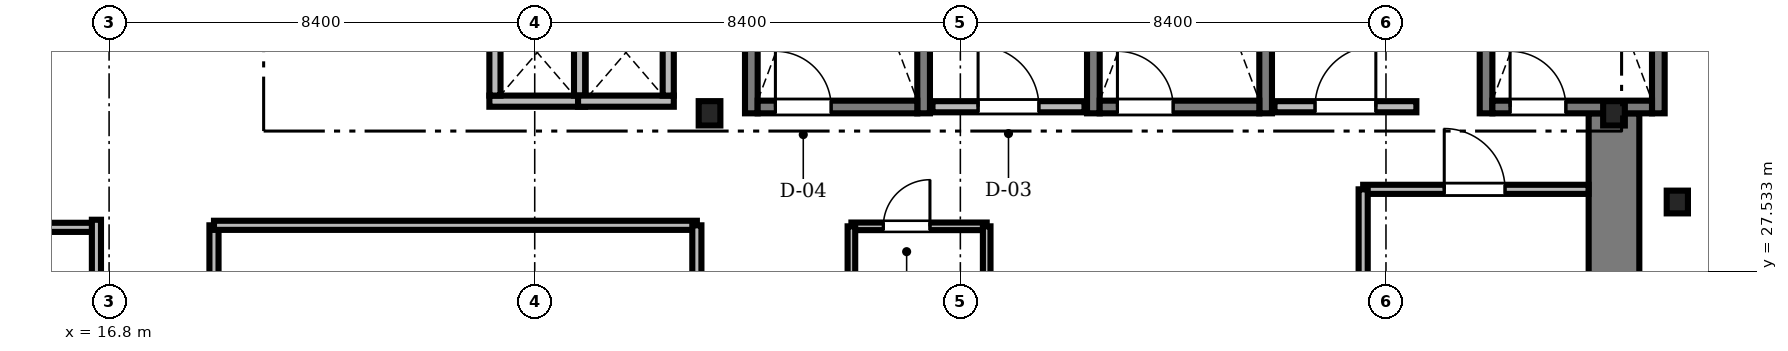
"""IFC4 building model, lengths in metres.
Left out: names, types, materials, properties, quantities, classifications, styles, units other than length and angle.
Written with IfcOpenShell. Run it as: python <this file> out.ifc"""

import sys

from ifc_helpers import new_model, si_unit, direction, frame, frame_2d, origin, origin_2d, place, context, subcontext, project, spatial, rectangle, i_section, extrude, source, transform, mapped, element, fill, save


model = new_model("IFC4")
c1 = context("Model", 3, precision=1e-05, world=origin(), true_north=direction((0.0, 1.0)))
c2 = subcontext(c1, "Body", "Model", "MODEL_VIEW")
j1 = project(units=[si_unit("LENGTHUNIT", "METRE"), si_unit("PLANEANGLEUNIT", "RADIAN")], contexts=[c1])
p1 = place(None, origin())
s1 = spatial("IfcSite", under=j1, at=p1, CompositionType="ELEMENT")
p2 = place(p1, origin())
s2 = spatial("IfcBuilding", under=s1, at=p2, CompositionType="ELEMENT")
p3 = place(p2, frame((0.0, 0.0, 75.05)))
s3 = spatial("IfcBuildingStorey", under=s2, at=p3, CompositionType="ELEMENT", Elevation=75.05)
m1 = source(origin(), c2, "Body", "SweptSolid", [
    extrude(rectangle(XDim=13.15, YDim=1.0, at=frame_2d((6.575, 0.0))), origin(), (0.0, 0.0, 1.0), 3.41),
])
p4 = place(p3, frame((46.5, 17.5, 0.0), z_axis=(0.0, 0.0, 1.0), x_axis=(0.0, 1.0, 0.0)))
e1 = element("IfcWall", 1, at=p4, inside=s3, PredefinedType="SHEAR", context=c2, shape_type="MappedRepresentation", body=[
    mapped(m1, transform((0.0, 0.0, 0.0), scale=1.0)),
])
m2 = source(origin(), c2, "Body", "SweptSolid", [
    extrude(i_section(OverallWidth=0.428, OverallDepth=0.481, WebThickness=0.04, FlangeThickness=0.063, FilletRadius=0.015, at=origin_2d()), origin(), (0.0, 0.0, 1.0), 3.41),
])
for number, where, z_axis, x_axis in (
    (2, (28.65, 30.65, 0.0), (0.0, 0.0, 1.0), (1.0, 0.0, 0.0)),
    (3, (46.5, 30.65, 0.0), (0.0, 0.0, 1.0), (1.0, 0.0, 0.0)),
):
    element("IfcColumn", number, at=place(p3, frame(where, z_axis=z_axis, x_axis=x_axis)), inside=s3, PredefinedType="COLUMN", context=c2, shape_type="MappedRepresentation", body=[
        mapped(m2, transform((0.0, 0.0, 0.0), scale=1.0)),
    ])
m3 = source(origin(), c2, "Body", "SweptSolid", [
    extrude(i_section(OverallWidth=0.419, OverallDepth=0.449, WebThickness=0.031, FlangeThickness=0.048, FilletRadius=0.015, at=origin_2d()), origin(), (0.0, 0.0, 1.0), 3.41),
])
p5 = place(p3, frame((47.75, 28.9, 0.0), z_axis=(0.0, 0.0, 1.0), x_axis=(1.0, 0.0, 0.0)))
e4 = element("IfcColumn", 4, at=p5, inside=s3, PredefinedType="COLUMN", context=c2, shape_type="MappedRepresentation", body=[
    mapped(m3, transform((0.0, 0.0, 0.0), scale=1.0)),
])
m4 = source(origin(), c2, "Body", "SweptSolid", [
    extrude(rectangle(XDim=9.15, YDim=0.25, at=frame_2d((4.575, 0.0))), origin(), (0.0, 0.0, 1.0), 3.45),
])
for number, where, z_axis, x_axis in (
    (5, (29.475, 30.65, 0.0), (0.0, 0.0, 1.0), (0.0, 1.0, 0.0)),
    (6, (32.875, 30.65, 0.0), (0.0, 0.0, 1.0), (0.0, 1.0, 0.0)),
):
    element("IfcWall", number, at=place(p3, frame(where, z_axis=z_axis, x_axis=x_axis)), inside=s3, PredefinedType="SOLIDWALL", context=c2, shape_type="MappedRepresentation", body=[
        mapped(m4, transform((0.0, 0.0, 0.0), scale=1.0)),
    ])
m5 = source(origin(), c2, "Body", "SweptSolid", [
    extrude(rectangle(XDim=3.15, YDim=0.25, at=frame_2d((1.575, 0.0))), origin(), (0.0, 0.0, 1.0), 3.45),
])
p6 = place(p3, frame((29.6, 30.775, 0.0), z_axis=(0.0, 0.0, 1.0), x_axis=(1.0, 0.0, 0.0)))
e7 = element("IfcWall", 7, at=p6, inside=s3, PredefinedType="SOLIDWALL", context=c2, shape_type="MappedRepresentation", body=[
    mapped(m5, transform((0.0, 0.0, 0.0), scale=1.0)),
])
m6 = source(origin(), c2, "Body", "SweptSolid", [
    extrude(rectangle(XDim=1.1, YDim=2.2, at=frame_2d((0.55, 1.1))), frame((0.0, 0.135, 0.0), z_axis=(0.0, -1.0, 0.0), x_axis=(1.0, 0.0, 0.0)), (0.0, 0.0, 1.0), 0.27),
])
p7 = place(p6, frame((0.35, 0.0, 0.0)))
e8 = element("IfcOpeningElement", 8, at=p7, cuts=e7, PredefinedType="OPENING", context=c2, shape_type="MappedRepresentation", body=[
    mapped(m6, transform((0.0, 0.0, 0.0), scale=1.0)),
])
for number, where, z_axis, x_axis in (
    (9, (36.225, 30.65, 0.0), (0.0, 0.0, 1.0), (0.0, 1.0, 0.0)),
    (10, (39.625, 30.65, 0.0), (0.0, 0.0, 1.0), (0.0, 1.0, 0.0)),
):
    element("IfcWall", number, at=place(p3, frame(where, z_axis=z_axis, x_axis=x_axis)), inside=s3, PredefinedType="SOLIDWALL", context=c2, shape_type="MappedRepresentation", body=[
        mapped(m4, transform((0.0, 0.0, 0.0), scale=1.0)),
    ])
p8 = place(p3, frame((36.35, 30.775, 0.0), z_axis=(0.0, 0.0, 1.0), x_axis=(1.0, 0.0, 0.0)))
e11 = element("IfcWall", 11, at=p8, inside=s3, PredefinedType="SOLIDWALL", context=c2, shape_type="MappedRepresentation", body=[
    mapped(m5, transform((0.0, 0.0, 0.0), scale=1.0)),
])
p9 = place(p8, frame((0.35, 0.0, 0.0)))
e12 = element("IfcOpeningElement", 12, at=p9, cuts=e11, PredefinedType="OPENING", context=c2, shape_type="MappedRepresentation", body=[
    mapped(m6, transform((0.0, 0.0, 0.0), scale=1.0)),
])
for number, where, z_axis, x_axis in (
    (13, (43.975, 30.65, 0.0), (0.0, 0.0, 1.0), (0.0, 1.0, 0.0)),
    (14, (47.375, 30.65, 0.0), (0.0, 0.0, 1.0), (0.0, 1.0, 0.0)),
):
    element("IfcWall", number, at=place(p3, frame(where, z_axis=z_axis, x_axis=x_axis)), inside=s3, PredefinedType="SOLIDWALL", context=c2, shape_type="MappedRepresentation", body=[
        mapped(m4, transform((0.0, 0.0, 0.0), scale=1.0)),
    ])
p10 = place(p3, frame((44.1, 30.775, 0.0), z_axis=(0.0, 0.0, 1.0), x_axis=(1.0, 0.0, 0.0)))
e15 = element("IfcWall", 15, at=p10, inside=s3, PredefinedType="SOLIDWALL", context=c2, shape_type="MappedRepresentation", body=[
    mapped(m5, transform((0.0, 0.0, 0.0), scale=1.0)),
])
p11 = place(p10, frame((0.35, 0.0, 0.0)))
e16 = element("IfcOpeningElement", 16, at=p11, cuts=e15, PredefinedType="OPENING", context=c2, shape_type="MappedRepresentation", body=[
    mapped(m6, transform((0.0, 0.0, 0.0), scale=1.0)),
])
m7 = source(origin(), c2, "Body", "SweptSolid", [
    extrude(rectangle(XDim=3.0, YDim=0.22, at=frame_2d((1.5, 0.0))), origin(), (0.0, 0.0, 1.0), 3.41),
])
p12 = place(p3, frame((33.05, 30.78, 0.0), z_axis=(0.0, 0.0, 1.0), x_axis=(1.0, 0.0, 0.0)))
e17 = element("IfcWall", 17, at=p12, inside=s3, PredefinedType="SOLIDWALL", context=c2, shape_type="MappedRepresentation", body=[
    mapped(m7, transform((0.0, 0.0, 0.0), scale=1.0)),
])
m8 = source(origin(), c2, "Body", "SweptSolid", [
    extrude(rectangle(XDim=1.2, YDim=2.2, at=frame_2d((0.6, 1.1))), frame((0.0, 0.12, 0.0), z_axis=(0.0, -1.0, 0.0), x_axis=(1.0, 0.0, 0.0)), (0.0, 0.0, 1.0), 0.24),
])
p13 = place(p12, frame((0.9, 0.0, 0.0)))
e18 = element("IfcOpeningElement", 18, at=p13, cuts=e17, PredefinedType="OPENING", context=c2, shape_type="MappedRepresentation", body=[
    mapped(m8, transform((0.0, 0.0, 0.0), scale=1.0)),
])
m9 = source(origin(), c2, "Body", "SweptSolid", [
    extrude(rectangle(XDim=2.8, YDim=0.22, at=frame_2d((1.4, 0.0))), origin(), (0.0, 0.0, 1.0), 3.41),
])
p14 = place(p3, frame((39.8, 30.78, 0.0), z_axis=(0.0, 0.0, 1.0), x_axis=(1.0, 0.0, 0.0)))
e19 = element("IfcWall", 19, at=p14, inside=s3, PredefinedType="SOLIDWALL", context=c2, shape_type="MappedRepresentation", body=[
    mapped(m9, transform((0.0, 0.0, 0.0), scale=1.0)),
])
p15 = place(p14, frame((0.8, 0.0, 0.0)))
e20 = element("IfcOpeningElement", 20, at=p15, cuts=e19, PredefinedType="OPENING", context=c2, shape_type="MappedRepresentation", body=[
    mapped(m8, transform((0.0, 0.0, 0.0), scale=1.0)),
])
m10 = source(origin(), c2, "Body", "SweptSolid", [
    extrude(rectangle(XDim=1.89, YDim=0.22, at=frame_2d((0.945, 0.0))), origin(), (0.0, 0.0, 1.0), 3.41),
])
p16 = place(p3, frame((24.305, 30.89, 0.0), z_axis=(0.0, 0.0, 1.0), x_axis=(1.0, 0.0, 0.0)))
e21 = element("IfcWall", 21, at=p16, inside=s3, PredefinedType="SOLIDWALL", context=c2, shape_type="MappedRepresentation", body=[
    mapped(m10, transform((0.0, 0.0, 0.0), scale=1.0)),
])
m11 = source(origin(), c2, "Body", "SweptSolid", [
    extrude(rectangle(XDim=1.7, YDim=0.22, at=frame_2d((0.85, 0.0))), origin(), (0.0, 0.0, 1.0), 3.41),
])
for number, where, z_axis, x_axis in (
    (22, (24.415, 31.0, 0.0), (0.0, 0.0, 1.0), (0.0, 1.0, 0.0)),
    (23, (26.085, 31.0, 0.0), (0.0, 0.0, 1.0), (0.0, 1.0, 0.0)),
):
    element("IfcWall", number, at=place(p3, frame(where, z_axis=z_axis, x_axis=x_axis)), inside=s3, PredefinedType="SOLIDWALL", context=c2, shape_type="MappedRepresentation", body=[
        mapped(m11, transform((0.0, 0.0, 0.0), scale=1.0)),
    ])
p17 = place(p3, frame((26.055, 30.89, 0.0), z_axis=(0.0, 0.0, 1.0), x_axis=(1.0, 0.0, 0.0)))
e24 = element("IfcWall", 24, at=p17, inside=s3, PredefinedType="SOLIDWALL", context=c2, shape_type="MappedRepresentation", body=[
    mapped(m10, transform((0.0, 0.0, 0.0), scale=1.0)),
])
p18 = place(p3, frame((27.835, 31.0, 0.0), z_axis=(0.0, 0.0, 1.0), x_axis=(0.0, 1.0, 0.0)))
e25 = element("IfcWall", 25, at=p18, inside=s3, PredefinedType="SOLIDWALL", context=c2, shape_type="MappedRepresentation", body=[
    mapped(m11, transform((0.0, 0.0, 0.0), scale=1.0)),
])
m12 = source(origin(), c2, "Body", "SweptSolid", [
    extrude(rectangle(XDim=6.54, YDim=0.18, at=frame_2d((3.27, 0.0))), origin(), (0.0, 0.0, 1.0), 2.802),
])
p19 = place(p3, frame((18.87, 21.9, 0.0), z_axis=(0.0, 0.0, 1.0), x_axis=(0.0, 1.0, 0.0)))
e26 = element("IfcWall", 26, at=p19, inside=s3, PredefinedType="PARTITIONING", context=c2, shape_type="MappedRepresentation", body=[
    mapped(m12, transform((0.0, 0.0, 0.0), scale=1.0)),
])
m13 = source(origin(), c2, "Body", "SweptSolid", [
    extrude(rectangle(XDim=1.05, YDim=2.2, at=frame_2d((0.525, 1.1))), frame((0.0, 0.1, 0.0), z_axis=(0.0, -1.0, 0.0), x_axis=(1.0, 0.0, 0.0)), (0.0, 0.0, 1.0), 0.2),
])
p20 = place(p19, frame((2.2, 0.0, 0.0)))
e27 = element("IfcOpeningElement", 27, at=p20, cuts=e26, PredefinedType="OPENING", context=c2, shape_type="MappedRepresentation", body=[
    mapped(m13, transform((0.0, 0.0, 0.0), scale=1.0)),
])
m14 = source(origin(), c2, "Body", "SweptSolid", [
    extrude(rectangle(XDim=4.448, YDim=0.18, at=frame_2d((2.224, 0.0))), origin(), (0.0, 0.0, 1.0), 3.042),
])
p21 = place(p3, frame((41.55, 29.15, 0.0), z_axis=(0.0, 0.0, 1.0), x_axis=(1.0, 0.0, 0.0)))
e28 = element("IfcWall", 28, at=p21, inside=s3, PredefinedType="PARTITIONING", context=c2, shape_type="MappedRepresentation", body=[
    mapped(m14, transform((0.0, 0.0, 0.0), scale=1.0)),
])
m15 = source(origin(), c2, "Body", "SweptSolid", [
    extrude(rectangle(XDim=1.2, YDim=2.2, at=frame_2d((0.6, 1.1))), frame((0.0, 0.1, 0.0), z_axis=(0.0, -1.0, 0.0), x_axis=(1.0, 0.0, 0.0)), (0.0, 0.0, 1.0), 0.2),
])
p22 = place(p21, frame((1.6, 0.0, 0.0)))
e29 = element("IfcOpeningElement", 29, at=p22, cuts=e28, PredefinedType="OPENING", context=c2, shape_type="MappedRepresentation", body=[
    mapped(m15, transform((0.0, 0.0, 0.0), scale=1.0)),
])
m16 = source(origin(), c2, "Body", "SweptSolid", [
    extrude(rectangle(XDim=2.67, YDim=0.15, at=frame_2d((1.335, 0.0))), origin(), (0.0, 0.0, 1.0), 3.042),
])
p23 = place(p3, frame((31.45, 28.42, 0.0), z_axis=(0.0, 0.0, 1.0), x_axis=(1.0, 0.0, 0.0)))
e30 = element("IfcWall", 30, at=p23, inside=s3, PredefinedType="PARTITIONING", context=c2, shape_type="MappedRepresentation", body=[
    mapped(m16, transform((0.0, 0.0, 0.0), scale=1.0)),
])
m17 = source(origin(), c2, "Body", "SweptSolid", [
    extrude(rectangle(XDim=0.92, YDim=2.1, at=frame_2d((0.46, 1.05))), frame((0.0, 0.085, 0.0), z_axis=(0.0, -1.0, 0.0), x_axis=(1.0, 0.0, 0.0)), (0.0, 0.0, 1.0), 0.17),
])
p24 = place(p23, frame((0.63, 0.0, 0.0)))
e31 = element("IfcOpeningElement", 31, at=p24, cuts=e30, PredefinedType="OPENING", context=c2, shape_type="MappedRepresentation", body=[
    mapped(m17, transform((0.0, 0.0, 0.0), scale=1.0)),
])
m18 = source(origin(), c2, "Body", "SweptSolid", [
    extrude(rectangle(XDim=14.32, YDim=0.18, at=frame_2d((7.16, 0.0))), origin(), (0.0, 0.0, 1.0), 2.652),
])
p25 = place(p3, frame((2.23, 28.4, 0.0), z_axis=(0.0, 0.0, 1.0), x_axis=(1.0, 0.0, 0.0)))
e32 = element("IfcWall", 32, at=p25, inside=s3, PredefinedType="PARTITIONING", context=c2, shape_type="MappedRepresentation", body=[
    mapped(m18, transform((0.0, 0.0, 0.0), scale=1.0)),
])
m19 = source(origin(), c2, "Body", "SweptSolid", [
    extrude(rectangle(XDim=13.79, YDim=0.18, at=frame_2d((6.895, 0.0))), origin(), (0.0, 0.0, 1.0), 2.802),
])
p26 = place(p3, frame((16.55, 14.76, 0.0), z_axis=(0.0, 0.0, 1.0), x_axis=(0.0, 1.0, 0.0)))
e33 = element("IfcWall", 33, at=p26, inside=s3, PredefinedType="PARTITIONING", context=c2, shape_type="MappedRepresentation", body=[
    mapped(m19, transform((0.0, 0.0, 0.0), scale=1.0)),
])
m20 = source(origin(), c2, "Body", "SweptSolid", [
    extrude(rectangle(XDim=9.53, YDim=0.18, at=frame_2d((4.765, 0.0))), origin(), (0.0, 0.0, 1.0), 3.41),
])
p27 = place(p3, frame((18.87, 28.44, 0.0), z_axis=(0.0, 0.0, 1.0), x_axis=(1.0, 0.0, 0.0)))
e34 = element("IfcWall", 34, at=p27, inside=s3, PredefinedType="PARTITIONING", context=c2, shape_type="MappedRepresentation", body=[
    mapped(m20, transform((0.0, 0.0, 0.0), scale=1.0)),
])
p28 = place(p3, frame((28.4, 21.9, 0.0), z_axis=(0.0, 0.0, 1.0), x_axis=(0.0, 1.0, 0.0)))
e35 = element("IfcWall", 35, at=p28, inside=s3, PredefinedType="PARTITIONING", context=c2, shape_type="MappedRepresentation", body=[
    mapped(m12, transform((0.0, 0.0, 0.0), scale=1.0)),
])
m21 = source(origin(), c2, "Body", "SweptSolid", [
    extrude(rectangle(XDim=2.35, YDim=0.18, at=frame_2d((1.175, 0.0))), origin(), (0.0, 0.0, 1.0), 2.802),
])
p29 = place(p3, frame((41.55, 26.8, 0.0), z_axis=(0.0, 0.0, 1.0), x_axis=(0.0, 1.0, 0.0)))
e36 = element("IfcWall", 36, at=p29, inside=s3, PredefinedType="PARTITIONING", context=c2, shape_type="MappedRepresentation", body=[
    mapped(m21, transform((0.0, 0.0, 0.0), scale=1.0)),
])
m22 = source(origin(), c2, "Body", "SweptSolid", [
    extrude(rectangle(XDim=1.6, YDim=0.15, at=frame_2d((0.8, 0.0))), origin(), (0.0, 0.0, 1.0), 2.952),
])
for number, where, z_axis, x_axis in (
    (37, (31.45, 26.82, 0.0), (0.0, 0.0, 1.0), (0.0, 1.0, 0.0)),
    (38, (34.12, 26.82, 0.0), (0.0, 0.0, 1.0), (0.0, 1.0, 0.0)),
):
    element("IfcWall", number, at=place(p3, frame(where, z_axis=z_axis, x_axis=x_axis)), inside=s3, PredefinedType="PARTITIONING", context=c2, shape_type="MappedRepresentation", body=[
        mapped(m22, transform((0.0, 0.0, 0.0), scale=1.0)),
    ])
m23 = source(origin(), c2, "Body", "SweptSolid", [
    extrude(rectangle(XDim=1.1, YDim=2.2, at=frame_2d((0.55, 1.1))), frame((0.0, 0.025, 0.0), z_axis=(0.0, -1.0, 0.0), x_axis=(1.0, 0.0, 0.0)), (0.0, 0.0, 1.0), 0.05),
])
p30 = place(p7, origin())
e39 = element("IfcDoor", 39, at=p30, inside=s3, OperationType="SINGLE_SWING_LEFT", PredefinedType="DOOR", context=c2, shape_type="MappedRepresentation", body=[
    mapped(m23, transform((0.0, 0.0, 0.0), scale=1.0)),
])
fill(e8, e39)
p31 = place(p9, origin())
e40 = element("IfcDoor", 40, at=p31, inside=s3, OperationType="SINGLE_SWING_LEFT", PredefinedType="DOOR", context=c2, shape_type="MappedRepresentation", body=[
    mapped(m23, transform((0.0, 0.0, 0.0), scale=1.0)),
])
fill(e12, e40)
p32 = place(p11, origin())
e41 = element("IfcDoor", 41, at=p32, inside=s3, OperationType="SINGLE_SWING_LEFT", PredefinedType="DOOR", context=c2, shape_type="MappedRepresentation", body=[
    mapped(m23, transform((0.0, 0.0, 0.0), scale=1.0)),
])
fill(e16, e41)
m24 = source(origin(), c2, "Body", "SweptSolid", [
    extrude(rectangle(XDim=1.2, YDim=2.2, at=frame_2d((0.6, 1.1))), frame((0.0, 0.025, 0.0), z_axis=(0.0, -1.0, 0.0), x_axis=(1.0, 0.0, 0.0)), (0.0, 0.0, 1.0), 0.05),
])
p33 = place(p13, origin())
e42 = element("IfcDoor", 42, at=p33, inside=s3, OperationType="SINGLE_SWING_LEFT", PredefinedType="DOOR", context=c2, shape_type="MappedRepresentation", body=[
    mapped(m24, transform((0.0, 0.0, 0.0), scale=1.0)),
])
fill(e18, e42)
p34 = place(p15, origin())
e43 = element("IfcDoor", 43, at=p34, inside=s3, OperationType="SINGLE_SWING_RIGHT", PredefinedType="DOOR", context=c2, shape_type="MappedRepresentation", body=[
    mapped(m24, transform((0.0, 0.0, 0.0), scale=1.0)),
])
fill(e20, e43)
p35 = place(p22, origin())
e44 = element("IfcDoor", 44, at=p35, inside=s3, OperationType="SINGLE_SWING_LEFT", PredefinedType="DOOR", context=c2, shape_type="MappedRepresentation", body=[
    mapped(m24, transform((0.0, 0.0, 0.0), scale=1.0)),
])
fill(e29, e44)
m25 = source(origin(), c2, "Body", "SweptSolid", [
    extrude(rectangle(XDim=0.92, YDim=2.1, at=frame_2d((0.46, 1.05))), frame((0.0, 0.025, 0.0), z_axis=(0.0, -1.0, 0.0), x_axis=(1.0, 0.0, 0.0)), (0.0, 0.0, 1.0), 0.05),
])
p36 = place(p24, origin())
e45 = element("IfcDoor", 45, at=p36, inside=s3, OperationType="SINGLE_SWING_RIGHT", PredefinedType="DOOR", context=c2, shape_type="MappedRepresentation", body=[
    mapped(m25, transform((0.0, 0.0, 0.0), scale=1.0)),
])
fill(e31, e45)
save(model, sys.argv[1])
